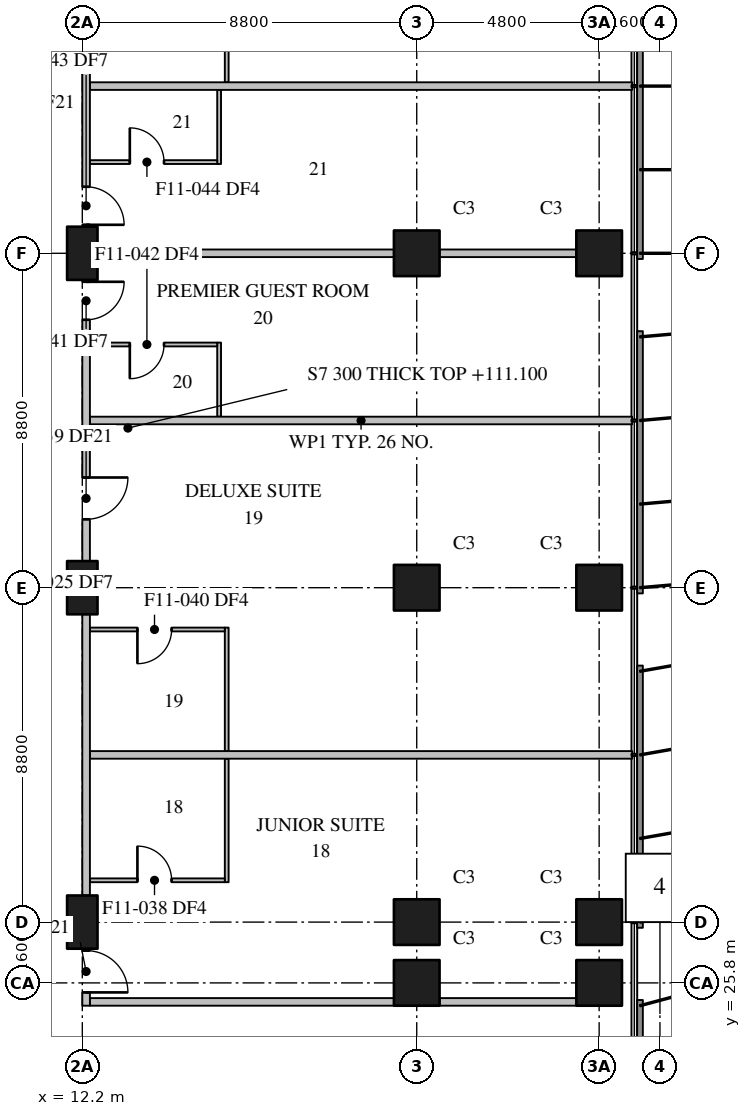
"""IFC4 building model, lengths in metres.
Left out: names, types, materials, properties, quantities, classifications, styles, units other than length and angle.
Written with IfcOpenShell. Run it as: python <this file> out.ifc"""

import sys

from ifc_helpers import new_model, si_unit, direction, frame, frame_2d, origin, origin_2d, place, context, subcontext, project, spatial, rectangle, extrude, element, fill, save


model = new_model("IFC4")
c1 = context("Model", 3, precision=1e-05, world=origin(), true_north=direction((0.0, 1.0)))
c2 = subcontext(c1, "Body", "Model", "MODEL_VIEW")
j1 = project(units=[si_unit("LENGTHUNIT", "METRE"), si_unit("PLANEANGLEUNIT", "RADIAN")], contexts=[c1])
p1 = place(None, origin())
s1 = spatial("IfcSite", under=j1, at=p1, CompositionType="ELEMENT")
p2 = place(p1, origin())
s2 = spatial("IfcBuilding", under=s1, at=p2, CompositionType="ELEMENT")
p3 = place(p2, frame((0.0, 0.0, 111.1)))
s3 = spatial("IfcBuildingStorey", under=s2, at=p3, CompositionType="ELEMENT", Elevation=111.1)
for number, where, z_axis, x_axis in (
    (1, (12.2, 27.4, 0.0), (0.0, 0.0, 1.0), (0.0, 1.0, 0.0)),
    (2, (12.2, 36.2, 0.0), (0.0, 0.0, 1.0), (0.0, 1.0, 0.0)),
    (3, (12.2, 45.0, 0.0), (0.0, 0.0, 1.0), (0.0, 1.0, 0.0)),
):
    element("IfcColumn", number, at=place(p3, frame(where, z_axis=z_axis, x_axis=x_axis)), inside=s3, PredefinedType="COLUMN", context=c2, shape_type="SweptSolid", body=[
        extrude(rectangle(XDim=1.4, YDim=0.8, at=origin_2d()), origin(), (0.0, 0.0, 1.0), 3.7),
    ])
for number, where, z_axis, x_axis in (
    (4, (21.0, 25.8, 0.0), (0.0, 0.0, 1.0), (1.0, 0.0, 0.0)),
    (5, (21.0, 27.4, 0.0), (0.0, 0.0, 1.0), (1.0, 0.0, 0.0)),
    (6, (21.0, 36.2, 0.0), (0.0, 0.0, 1.0), (1.0, 0.0, 0.0)),
    (7, (21.0, 45.0, 0.0), (0.0, 0.0, 1.0), (1.0, 0.0, 0.0)),
    (8, (25.8, 25.8, 0.0), (0.0, 0.0, 1.0), (1.0, 0.0, 0.0)),
    (9, (25.8, 27.4, 0.0), (0.0, 0.0, 1.0), (1.0, 0.0, 0.0)),
    (10, (25.8, 36.2, 0.0), (0.0, 0.0, 1.0), (1.0, 0.0, 0.0)),
    (11, (25.8, 45.0, 0.0), (0.0, 0.0, 1.0), (1.0, 0.0, 0.0)),
):
    element("IfcColumn", number, at=place(p3, frame(where, z_axis=z_axis, x_axis=x_axis)), inside=s3, PredefinedType="COLUMN", context=c2, shape_type="SweptSolid", body=[
        extrude(rectangle(XDim=1.2, YDim=1.2, at=origin_2d()), origin(), (0.0, 0.0, 1.0), 3.7),
    ])
for number, where, z_axis, x_axis in (
    (12, (12.4, 40.6, 0.0), (0.0, 0.0, 1.0), (1.0, 0.0, 0.0)),
    (13, (12.4, 49.4, 0.0), (0.0, 0.0, 1.0), (1.0, 0.0, 0.0)),
):
    element("IfcWall", number, at=place(p3, frame(where, z_axis=z_axis, x_axis=x_axis)), inside=s3, PredefinedType="PARTITIONING", context=c2, shape_type="SweptSolid", body=[
        extrude(rectangle(XDim=14.27, YDim=0.2, at=frame_2d((7.135, 0.0))), origin(), (0.0, 0.0, 1.0), 3.4),
    ])
p4 = place(p3, frame((12.3, 26.7, 0.0), z_axis=(0.0, 0.0, 1.0), x_axis=(0.0, -1.0, 0.0)))
e14 = element("IfcWall", 14, at=p4, inside=s3, PredefinedType="PARTITIONING", context=c2, shape_type="SweptSolid", body=[
    extrude(rectangle(XDim=1.5, YDim=0.2, at=frame_2d((0.75, 0.0))), origin(), (0.0, 0.0, 1.0), 3.4),
])
p5 = place(p4, frame((0.05, 0.0, 0.0)))
e15 = element("IfcOpeningElement", 15, at=p5, cuts=e14, PredefinedType="OPENING", context=c2, shape_type="SweptSolid", body=[
    extrude(rectangle(XDim=1.1, YDim=2.1, at=frame_2d((0.55, 1.05))), frame((0.0, 0.11, 0.0), z_axis=(0.0, -1.0, 0.0), x_axis=(1.0, 0.0, 0.0)), (0.0, 0.0, 1.0), 0.22),
])
p6 = place(p3, frame((12.3, 28.1, 0.0), z_axis=(0.0, 0.0, 1.0), x_axis=(0.0, 1.0, 0.0)))
e16 = element("IfcWall", 16, at=p6, inside=s3, PredefinedType="PARTITIONING", context=c2, shape_type="SweptSolid", body=[
    extrude(rectangle(XDim=7.4, YDim=0.2, at=frame_2d((3.7, 0.0))), origin(), (0.0, 0.0, 1.0), 3.4),
])
p7 = place(p3, frame((12.3, 44.3, 0.0), z_axis=(0.0, 0.0, 1.0), x_axis=(0.0, -1.0, 0.0)))
e17 = element("IfcWall", 17, at=p7, inside=s3, PredefinedType="PARTITIONING", context=c2, shape_type="SweptSolid", body=[
    extrude(rectangle(XDim=7.4, YDim=0.2, at=frame_2d((3.7, 0.0))), origin(), (0.0, 0.0, 1.0), 3.4),
])
p8 = place(p7, frame((5.2, 0.0, 0.0)))
e18 = element("IfcOpeningElement", 18, at=p8, cuts=e17, PredefinedType="OPENING", context=c2, shape_type="SweptSolid", body=[
    extrude(rectangle(XDim=1.1, YDim=2.1, at=frame_2d((0.55, 1.05))), frame((0.0, 0.11, 0.0), z_axis=(0.0, -1.0, 0.0), x_axis=(1.0, 0.0, 0.0)), (0.0, 0.0, 1.0), 0.22),
])
p9 = place(p7, frame((0.05, 0.0, 0.0)))
e19 = element("IfcOpeningElement", 19, at=p9, cuts=e17, PredefinedType="OPENING", context=c2, shape_type="SweptSolid", body=[
    extrude(rectangle(XDim=1.0, YDim=2.1, at=frame_2d((0.5, 1.05))), frame((0.0, 0.11, 0.0), z_axis=(0.0, -1.0, 0.0), x_axis=(1.0, 0.0, 0.0)), (0.0, 0.0, 1.0), 0.22),
])
p10 = place(p3, frame((12.3, 53.1, 0.0), z_axis=(0.0, 0.0, 1.0), x_axis=(0.0, -1.0, 0.0)))
e20 = element("IfcWall", 20, at=p10, inside=s3, PredefinedType="PARTITIONING", context=c2, shape_type="SweptSolid", body=[
    extrude(rectangle(XDim=7.4, YDim=0.2, at=frame_2d((3.7, 0.0))), origin(), (0.0, 0.0, 1.0), 3.4),
])
p11 = place(p10, frame((6.35, 0.0, 0.0)))
e21 = element("IfcOpeningElement", 21, at=p11, cuts=e20, PredefinedType="OPENING", context=c2, shape_type="SweptSolid", body=[
    extrude(rectangle(XDim=1.0, YDim=2.1, at=frame_2d((0.5, 1.05))), frame((0.0, 0.11, 0.0), z_axis=(0.0, -1.0, 0.0), x_axis=(1.0, 0.0, 0.0)), (0.0, 0.0, 1.0), 0.22),
])
p12 = place(p3, frame((12.4, 25.3, 0.0), z_axis=(0.0, 0.0, 1.0), x_axis=(1.0, 0.0, 0.0)))
e22 = element("IfcWall", 22, at=p12, inside=s3, PredefinedType="PARTITIONING", context=c2, shape_type="SweptSolid", body=[
    extrude(rectangle(XDim=8.0, YDim=0.2, at=frame_2d((4.0, 0.0))), origin(), (0.0, 0.0, 1.0), 3.4),
])
p13 = place(p3, frame((21.6, 25.3, 0.0), z_axis=(0.0, 0.0, 1.0), x_axis=(1.0, 0.0, 0.0)))
e23 = element("IfcWall", 23, at=p13, inside=s3, PredefinedType="PARTITIONING", context=c2, shape_type="SweptSolid", body=[
    extrude(rectangle(XDim=3.6, YDim=0.2, at=frame_2d((1.8, 0.0))), origin(), (0.0, 0.0, 1.0), 3.4),
])
p14 = place(p3, frame((12.4, 31.8, 0.0), z_axis=(0.0, 0.0, 1.0), x_axis=(1.0, 0.0, 0.0)))
e24 = element("IfcWall", 24, at=p14, inside=s3, PredefinedType="PARTITIONING", context=c2, shape_type="SweptSolid", body=[
    extrude(rectangle(XDim=14.27, YDim=0.2, at=frame_2d((7.135, 0.0))), origin(), (0.0, 0.0, 1.0), 3.4),
])
p15 = place(p3, frame((12.6, 45.0, 0.0), z_axis=(0.0, 0.0, 1.0), x_axis=(1.0, 0.0, 0.0)))
e25 = element("IfcWall", 25, at=p15, inside=s3, PredefinedType="PARTITIONING", context=c2, shape_type="SweptSolid", body=[
    extrude(rectangle(XDim=7.8, YDim=0.2, at=frame_2d((3.9, 0.0))), origin(), (0.0, 0.0, 1.0), 3.4),
])
p16 = place(p3, frame((21.6, 45.0, 0.0), z_axis=(0.0, 0.0, 1.0), x_axis=(1.0, 0.0, 0.0)))
e26 = element("IfcWall", 26, at=p16, inside=s3, PredefinedType="PARTITIONING", context=c2, shape_type="SweptSolid", body=[
    extrude(rectangle(XDim=3.6, YDim=0.2, at=frame_2d((1.8, 0.0))), origin(), (0.0, 0.0, 1.0), 3.4),
])
for number, where, z_axis, x_axis in (
    (27, (16.0, 28.45, 0.0), (0.0, 0.0, 1.0), (0.0, 1.0, 0.0)),
    (28, (16.0, 31.9, 0.0), (0.0, 0.0, 1.0), (0.0, 1.0, 0.0)),
    (29, (16.0, 49.5, 0.0), (0.0, 0.0, 1.0), (0.0, 1.0, 0.0)),
):
    element("IfcWall", number, at=place(p3, frame(where, z_axis=z_axis, x_axis=x_axis)), inside=s3, PredefinedType="PARTITIONING", context=c2, shape_type="SweptSolid", body=[
        extrude(rectangle(XDim=3.25, YDim=0.1, at=frame_2d((1.625, 0.0))), origin(), (0.0, 0.0, 1.0), 3.4),
    ])
p17 = place(p3, frame((12.4, 28.5, 0.0), z_axis=(0.0, 0.0, 1.0), x_axis=(1.0, 0.0, 0.0)))
e30 = element("IfcWall", 30, at=p17, inside=s3, PredefinedType="PARTITIONING", context=c2, shape_type="SweptSolid", body=[
    extrude(rectangle(XDim=3.55, YDim=0.1, at=frame_2d((1.775, 0.0))), origin(), (0.0, 0.0, 1.0), 3.4),
])
p18 = place(p17, frame((1.25, 0.0, 0.0)))
e31 = element("IfcOpeningElement", 31, at=p18, cuts=e30, PredefinedType="OPENING", context=c2, shape_type="SweptSolid", body=[
    extrude(rectangle(XDim=0.9, YDim=2.1, at=frame_2d((0.45, 1.05))), frame((0.0, 0.06, 0.0), z_axis=(0.0, -1.0, 0.0), x_axis=(1.0, 0.0, 0.0)), (0.0, 0.0, 1.0), 0.12),
])
p19 = place(p3, frame((15.95, 35.1, 0.0), z_axis=(0.0, 0.0, 1.0), x_axis=(-1.0, 0.0, 0.0)))
e32 = element("IfcWall", 32, at=p19, inside=s3, PredefinedType="PARTITIONING", context=c2, shape_type="SweptSolid", body=[
    extrude(rectangle(XDim=3.55, YDim=0.1, at=frame_2d((1.775, 0.0))), origin(), (0.0, 0.0, 1.0), 3.4),
])
p20 = place(p19, frame((1.4, 0.0, 0.0)))
e33 = element("IfcOpeningElement", 33, at=p20, cuts=e32, PredefinedType="OPENING", context=c2, shape_type="SweptSolid", body=[
    extrude(rectangle(XDim=0.9, YDim=2.1, at=frame_2d((0.45, 1.05))), frame((0.0, 0.06, 0.0), z_axis=(0.0, -1.0, 0.0), x_axis=(1.0, 0.0, 0.0)), (0.0, 0.0, 1.0), 0.12),
])
for number, where, z_axis, x_axis in (
    (34, (15.8, 40.7, 0.0), (0.0, 0.0, 1.0), (0.0, 1.0, 0.0)),
    (35, (15.8, 47.35, 0.0), (0.0, 0.0, 1.0), (0.0, 1.0, 0.0)),
):
    element("IfcWall", number, at=place(p3, frame(where, z_axis=z_axis, x_axis=x_axis)), inside=s3, PredefinedType="PARTITIONING", context=c2, shape_type="SweptSolid", body=[
        extrude(rectangle(XDim=1.95, YDim=0.1, at=frame_2d((0.975, 0.0))), origin(), (0.0, 0.0, 1.0), 3.4),
    ])
p21 = place(p3, frame((15.75, 42.6, 0.0), z_axis=(0.0, 0.0, 1.0), x_axis=(-1.0, 0.0, 0.0)))
e36 = element("IfcWall", 36, at=p21, inside=s3, PredefinedType="PARTITIONING", context=c2, shape_type="SweptSolid", body=[
    extrude(rectangle(XDim=3.35, YDim=0.1, at=frame_2d((1.675, 0.0))), origin(), (0.0, 0.0, 1.0), 3.4),
])
p22 = place(p21, frame((1.4, 0.0, 0.0)))
e37 = element("IfcOpeningElement", 37, at=p22, cuts=e36, PredefinedType="OPENING", context=c2, shape_type="SweptSolid", body=[
    extrude(rectangle(XDim=0.9, YDim=2.1, at=frame_2d((0.45, 1.05))), frame((0.0, 0.06, 0.0), z_axis=(0.0, -1.0, 0.0), x_axis=(1.0, 0.0, 0.0)), (0.0, 0.0, 1.0), 0.12),
])
p23 = place(p3, frame((12.4, 47.4, 0.0), z_axis=(0.0, 0.0, 1.0), x_axis=(1.0, 0.0, 0.0)))
e38 = element("IfcWall", 38, at=p23, inside=s3, PredefinedType="PARTITIONING", context=c2, shape_type="SweptSolid", body=[
    extrude(rectangle(XDim=3.35, YDim=0.1, at=frame_2d((1.675, 0.0))), origin(), (0.0, 0.0, 1.0), 3.4),
])
p24 = place(p23, frame((1.05, 0.0, 0.0)))
e39 = element("IfcOpeningElement", 39, at=p24, cuts=e38, PredefinedType="OPENING", context=c2, shape_type="SweptSolid", body=[
    extrude(rectangle(XDim=0.9, YDim=2.1, at=frame_2d((0.45, 1.05))), frame((0.0, 0.06, 0.0), z_axis=(0.0, -1.0, 0.0), x_axis=(1.0, 0.0, 0.0)), (0.0, 0.0, 1.0), 0.12),
])
p25 = place(p5, origin())
e40 = element("IfcDoor", 40, at=p25, inside=s3, OperationType="SINGLE_SWING_RIGHT", PredefinedType="DOOR", context=c2, shape_type="SweptSolid", body=[
    extrude(rectangle(XDim=1.1, YDim=2.1, at=frame_2d((0.55, 1.05))), frame((0.0, 0.025, 0.0), z_axis=(0.0, -1.0, 0.0), x_axis=(1.0, 0.0, 0.0)), (0.0, 0.0, 1.0), 0.05),
])
fill(e15, e40)
p26 = place(p18, origin())
e41 = element("IfcDoor", 41, at=p26, inside=s3, OperationType="SINGLE_SWING_LEFT", PredefinedType="DOOR", context=c2, shape_type="SweptSolid", body=[
    extrude(rectangle(XDim=0.9, YDim=2.1, at=frame_2d((0.45, 1.05))), frame((0.0, 0.025, 0.0), z_axis=(0.0, -1.0, 0.0), x_axis=(1.0, 0.0, 0.0)), (0.0, 0.0, 1.0), 0.05),
])
fill(e31, e41)
p27 = place(p8, origin())
e42 = element("IfcDoor", 42, at=p27, inside=s3, OperationType="SINGLE_SWING_LEFT", PredefinedType="DOOR", context=c2, shape_type="SweptSolid", body=[
    extrude(rectangle(XDim=1.1, YDim=2.1, at=frame_2d((0.55, 1.05))), frame((0.0, 0.025, 0.0), z_axis=(0.0, -1.0, 0.0), x_axis=(1.0, 0.0, 0.0)), (0.0, 0.0, 1.0), 0.05),
])
fill(e18, e42)
p28 = place(p20, origin())
e43 = element("IfcDoor", 43, at=p28, inside=s3, OperationType="SINGLE_SWING_RIGHT", PredefinedType="DOOR", context=c2, shape_type="SweptSolid", body=[
    extrude(rectangle(XDim=0.9, YDim=2.1, at=frame_2d((0.45, 1.05))), frame((0.0, 0.025, 0.0), z_axis=(0.0, -1.0, 0.0), x_axis=(1.0, 0.0, 0.0)), (0.0, 0.0, 1.0), 0.05),
])
fill(e33, e43)
p29 = place(p9, origin())
e44 = element("IfcDoor", 44, at=p29, inside=s3, OperationType="SINGLE_SWING_LEFT", PredefinedType="DOOR", context=c2, shape_type="SweptSolid", body=[
    extrude(rectangle(XDim=1.0, YDim=2.1, at=frame_2d((0.5, 1.05))), frame((0.0, 0.025, 0.0), z_axis=(0.0, -1.0, 0.0), x_axis=(1.0, 0.0, 0.0)), (0.0, 0.0, 1.0), 0.05),
])
fill(e19, e44)
p30 = place(p22, origin())
e45 = element("IfcDoor", 45, at=p30, inside=s3, OperationType="SINGLE_SWING_RIGHT", PredefinedType="DOOR", context=c2, shape_type="SweptSolid", body=[
    extrude(rectangle(XDim=0.9, YDim=2.1, at=frame_2d((0.45, 1.05))), frame((0.0, 0.025, 0.0), z_axis=(0.0, -1.0, 0.0), x_axis=(1.0, 0.0, 0.0)), (0.0, 0.0, 1.0), 0.05),
])
fill(e37, e45)
p31 = place(p11, origin())
e46 = element("IfcDoor", 46, at=p31, inside=s3, OperationType="SINGLE_SWING_RIGHT", PredefinedType="DOOR", context=c2, shape_type="SweptSolid", body=[
    extrude(rectangle(XDim=1.0, YDim=2.1, at=frame_2d((0.5, 1.05))), frame((0.0, 0.025, 0.0), z_axis=(0.0, -1.0, 0.0), x_axis=(1.0, 0.0, 0.0)), (0.0, 0.0, 1.0), 0.05),
])
fill(e21, e46)
p32 = place(p24, origin())
e47 = element("IfcDoor", 47, at=p32, inside=s3, OperationType="SINGLE_SWING_LEFT", PredefinedType="DOOR", context=c2, shape_type="SweptSolid", body=[
    extrude(rectangle(XDim=0.9, YDim=2.1, at=frame_2d((0.45, 1.05))), frame((0.0, 0.025, 0.0), z_axis=(0.0, -1.0, 0.0), x_axis=(1.0, 0.0, 0.0)), (0.0, 0.0, 1.0), 0.05),
])
fill(e39, e47)
save(model, sys.argv[1])
